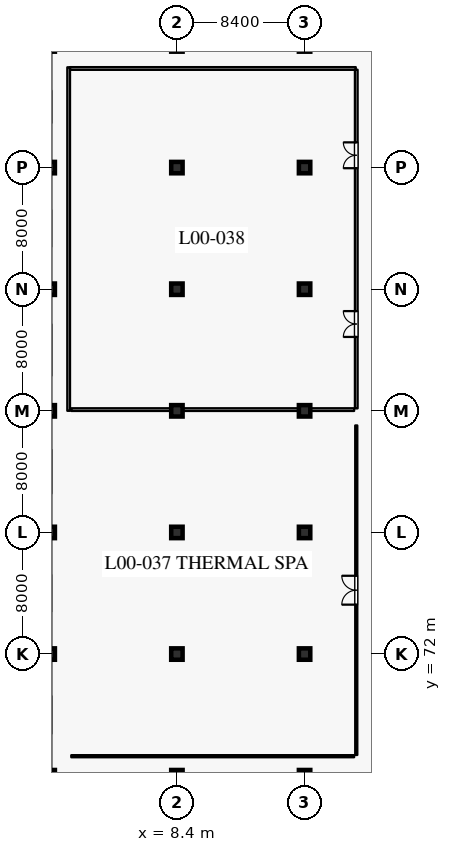
"""IFC4 building model, lengths in metres.
Left out: names, types, materials, properties, quantities, classifications, styles, units other than length and angle.
Written with IfcOpenShell. Run it as: python <this file> out.ifc"""

import sys

from ifc_helpers import new_model, si_unit, direction, frame, frame_2d, origin, origin_2d, place, context, subcontext, project, spatial, rectangle, extrude, element, fill, save


model = new_model("IFC4")
c1 = context("Model", 3, precision=1e-05, world=origin(), true_north=direction((0.0, 1.0)))
c2 = subcontext(c1, "Body", "Model", "MODEL_VIEW")
j1 = project(units=[si_unit("LENGTHUNIT", "METRE"), si_unit("PLANEANGLEUNIT", "RADIAN")], contexts=[c1])
p1 = place(None, origin())
s1 = spatial("IfcSite", under=j1, at=p1, CompositionType="ELEMENT")
p2 = place(p1, origin())
s2 = spatial("IfcBuilding", under=s1, at=p2, CompositionType="ELEMENT")
p3 = place(p2, origin())
s3 = spatial("IfcBuildingStorey", under=s2, at=p3, CompositionType="ELEMENT", Elevation=0.0)
for number, where, z_axis, x_axis in (
    (1, (0.0, 64.0, 0.0), (0.0, 0.0, 1.0), (1.0, 0.0, 0.0)),
    (2, (0.0, 72.0, 0.0), (0.0, 0.0, 1.0), (1.0, 0.0, 0.0)),
    (3, (0.0, 80.0, 0.0), (0.0, 0.0, 1.0), (1.0, 0.0, 0.0)),
    (4, (0.0, 88.0, 0.0), (0.0, 0.0, 1.0), (1.0, 0.0, 0.0)),
    (5, (0.0, 96.0, 0.0), (0.0, 0.0, 1.0), (1.0, 0.0, 0.0)),
    (6, (0.0, 104.0, 0.0), (0.0, 0.0, 1.0), (1.0, 0.0, 0.0)),
    (7, (8.4, 64.0, 0.0), (0.0, 0.0, 1.0), (1.0, 0.0, 0.0)),
    (8, (8.4, 72.0, 0.0), (0.0, 0.0, 1.0), (1.0, 0.0, 0.0)),
    (9, (8.4, 80.0, 0.0), (0.0, 0.0, 1.0), (1.0, 0.0, 0.0)),
    (10, (8.4, 88.0, 0.0), (0.0, 0.0, 1.0), (1.0, 0.0, 0.0)),
    (11, (8.4, 96.0, 0.0), (0.0, 0.0, 1.0), (1.0, 0.0, 0.0)),
    (12, (8.4, 104.0, 0.0), (0.0, 0.0, 1.0), (1.0, 0.0, 0.0)),
    (13, (16.8, 64.0, 0.0), (0.0, 0.0, 1.0), (1.0, 0.0, 0.0)),
    (14, (16.8, 72.0, 0.0), (0.0, 0.0, 1.0), (1.0, 0.0, 0.0)),
    (15, (16.8, 80.0, 0.0), (0.0, 0.0, 1.0), (1.0, 0.0, 0.0)),
    (16, (16.8, 88.0, 0.0), (0.0, 0.0, 1.0), (1.0, 0.0, 0.0)),
    (17, (16.8, 96.0, 0.0), (0.0, 0.0, 1.0), (1.0, 0.0, 0.0)),
    (18, (16.8, 104.0, 0.0), (0.0, 0.0, 1.0), (1.0, 0.0, 0.0)),
):
    element("IfcColumn", number, at=place(p3, frame(where, z_axis=z_axis, x_axis=x_axis)), inside=s3, PredefinedType="COLUMN", context=c2, shape_type="SweptSolid", body=[
        extrude(rectangle(XDim=0.75, YDim=0.75, at=origin_2d()), origin(), (0.0, 0.0, 1.0), 6.0),
    ])
p4 = place(p3, frame((20.2, 65.36, 0.0), z_axis=(0.0, 0.0, 1.0), x_axis=(0.0, 1.0, 0.0)))
e19 = element("IfcWall", 19, at=p4, inside=s3, PredefinedType="PARTITIONING", context=c2, shape_type="SweptSolid", body=[
    extrude(rectangle(XDim=21.68, YDim=0.14, at=frame_2d((10.84, 0.0))), origin(), (0.0, 0.0, 1.0), 5.675),
])
p5 = place(p4, frame((9.89, 0.0, 0.0)))
e20 = element("IfcOpeningElement", 20, at=p5, cuts=e19, PredefinedType="OPENING", context=c2, shape_type="SweptSolid", body=[
    extrude(rectangle(XDim=1.9, YDim=2.4, at=frame_2d((0.95, 1.2))), frame((0.0, 0.08, 0.0), z_axis=(0.0, -1.0, 0.0), x_axis=(1.0, 0.0, 0.0)), (0.0, 0.0, 1.0), 0.16),
])
p6 = place(p3, frame((1.45, 65.28, 0.0), z_axis=(0.0, 0.0, 1.0), x_axis=(1.0, 0.0, 0.0)))
e21 = element("IfcWall", 21, at=p6, inside=s3, PredefinedType="PARTITIONING", context=c2, shape_type="SweptSolid", body=[
    extrude(rectangle(XDim=18.61, YDim=0.14, at=frame_2d((9.305, 0.0))), origin(), (0.0, 0.0, 1.0), 5.675),
])
p7 = place(p3, frame((20.2, 88.16, 0.0), z_axis=(0.0, 0.0, 1.0), x_axis=(0.0, 1.0, 0.0)))
e22 = element("IfcWall", 22, at=p7, inside=s3, PredefinedType="PARTITIONING", context=c2, shape_type="SweptSolid", body=[
    extrude(rectangle(XDim=22.28, YDim=0.18, at=frame_2d((11.14, 0.0))), origin(), (0.0, 0.0, 1.0), 5.675),
])
p8 = place(p7, frame((4.7, 0.0, 0.0)))
e23 = element("IfcOpeningElement", 23, at=p8, cuts=e22, PredefinedType="OPENING", context=c2, shape_type="SweptSolid", body=[
    extrude(rectangle(XDim=1.7, YDim=2.3, at=frame_2d((0.85, 1.15))), frame((0.0, 0.1, 0.0), z_axis=(0.0, -1.0, 0.0), x_axis=(1.0, 0.0, 0.0)), (0.0, 0.0, 1.0), 0.2),
])
p9 = place(p7, frame((15.8, 0.0, 0.0)))
e24 = element("IfcOpeningElement", 24, at=p9, cuts=e22, PredefinedType="OPENING", context=c2, shape_type="SweptSolid", body=[
    extrude(rectangle(XDim=1.7, YDim=2.3, at=frame_2d((0.85, 1.15))), frame((0.0, 0.1, 0.0), z_axis=(0.0, -1.0, 0.0), x_axis=(1.0, 0.0, 0.0)), (0.0, 0.0, 1.0), 0.2),
])
p10 = place(p3, frame((1.45, 88.08, 0.0), z_axis=(0.0, 0.0, 1.0), x_axis=(1.0, 0.0, 0.0)))
e25 = element("IfcWall", 25, at=p10, inside=s3, PredefinedType="PARTITIONING", context=c2, shape_type="SweptSolid", body=[
    extrude(rectangle(XDim=18.61, YDim=0.18, at=frame_2d((9.305, 0.0))), origin(), (0.0, 0.0, 1.0), 4.85),
])
p11 = place(p3, frame((1.28, 88.0, 0.0), z_axis=(0.0, 0.0, 1.0), x_axis=(0.0, 1.0, 0.0)))
e26 = element("IfcWall", 26, at=p11, inside=s3, PredefinedType="PARTITIONING", context=c2, shape_type="SweptSolid", body=[
    extrude(rectangle(XDim=22.6, YDim=0.18, at=frame_2d((11.3, 0.0))), origin(), (0.0, 0.0, 1.0), 5.675),
])
p12 = place(p3, frame((1.37, 110.52, 0.0), z_axis=(0.0, 0.0, 1.0), x_axis=(1.0, 0.0, 0.0)))
e27 = element("IfcWall", 27, at=p12, inside=s3, PredefinedType="PARTITIONING", context=c2, shape_type="SweptSolid", body=[
    extrude(rectangle(XDim=18.798, YDim=0.18, at=frame_2d((9.399, 0.0))), origin(), (0.0, 0.0, 1.0), 5.675),
])
p13 = place(p5, origin())
e28 = element("IfcDoor", 28, at=p13, inside=s3, OperationType="DOUBLE_DOOR_SINGLE_SWING", PredefinedType="DOOR", context=c2, shape_type="SweptSolid", body=[
    extrude(rectangle(XDim=1.9, YDim=2.4, at=frame_2d((0.95, 1.2))), frame((0.0, 0.025, 0.0), z_axis=(0.0, -1.0, 0.0), x_axis=(1.0, 0.0, 0.0)), (0.0, 0.0, 1.0), 0.05),
])
fill(e20, e28)
p14 = place(p8, origin())
e29 = element("IfcDoor", 29, at=p14, inside=s3, OperationType="DOUBLE_DOOR_SINGLE_SWING", PredefinedType="DOOR", context=c2, shape_type="SweptSolid", body=[
    extrude(rectangle(XDim=1.7, YDim=2.3, at=frame_2d((0.85, 1.15))), frame((0.0, 0.025, 0.0), z_axis=(0.0, -1.0, 0.0), x_axis=(1.0, 0.0, 0.0)), (0.0, 0.0, 1.0), 0.05),
])
fill(e23, e29)
p15 = place(p9, origin())
e30 = element("IfcDoor", 30, at=p15, inside=s3, OperationType="DOUBLE_DOOR_SINGLE_SWING", PredefinedType="DOOR", context=c2, shape_type="SweptSolid", body=[
    extrude(rectangle(XDim=1.7, YDim=2.3, at=frame_2d((0.85, 1.15))), frame((0.0, 0.025, 0.0), z_axis=(0.0, -1.0, 0.0), x_axis=(1.0, 0.0, 0.0)), (0.0, 0.0, 1.0), 0.05),
])
fill(e24, e30)
save(model, sys.argv[1])
